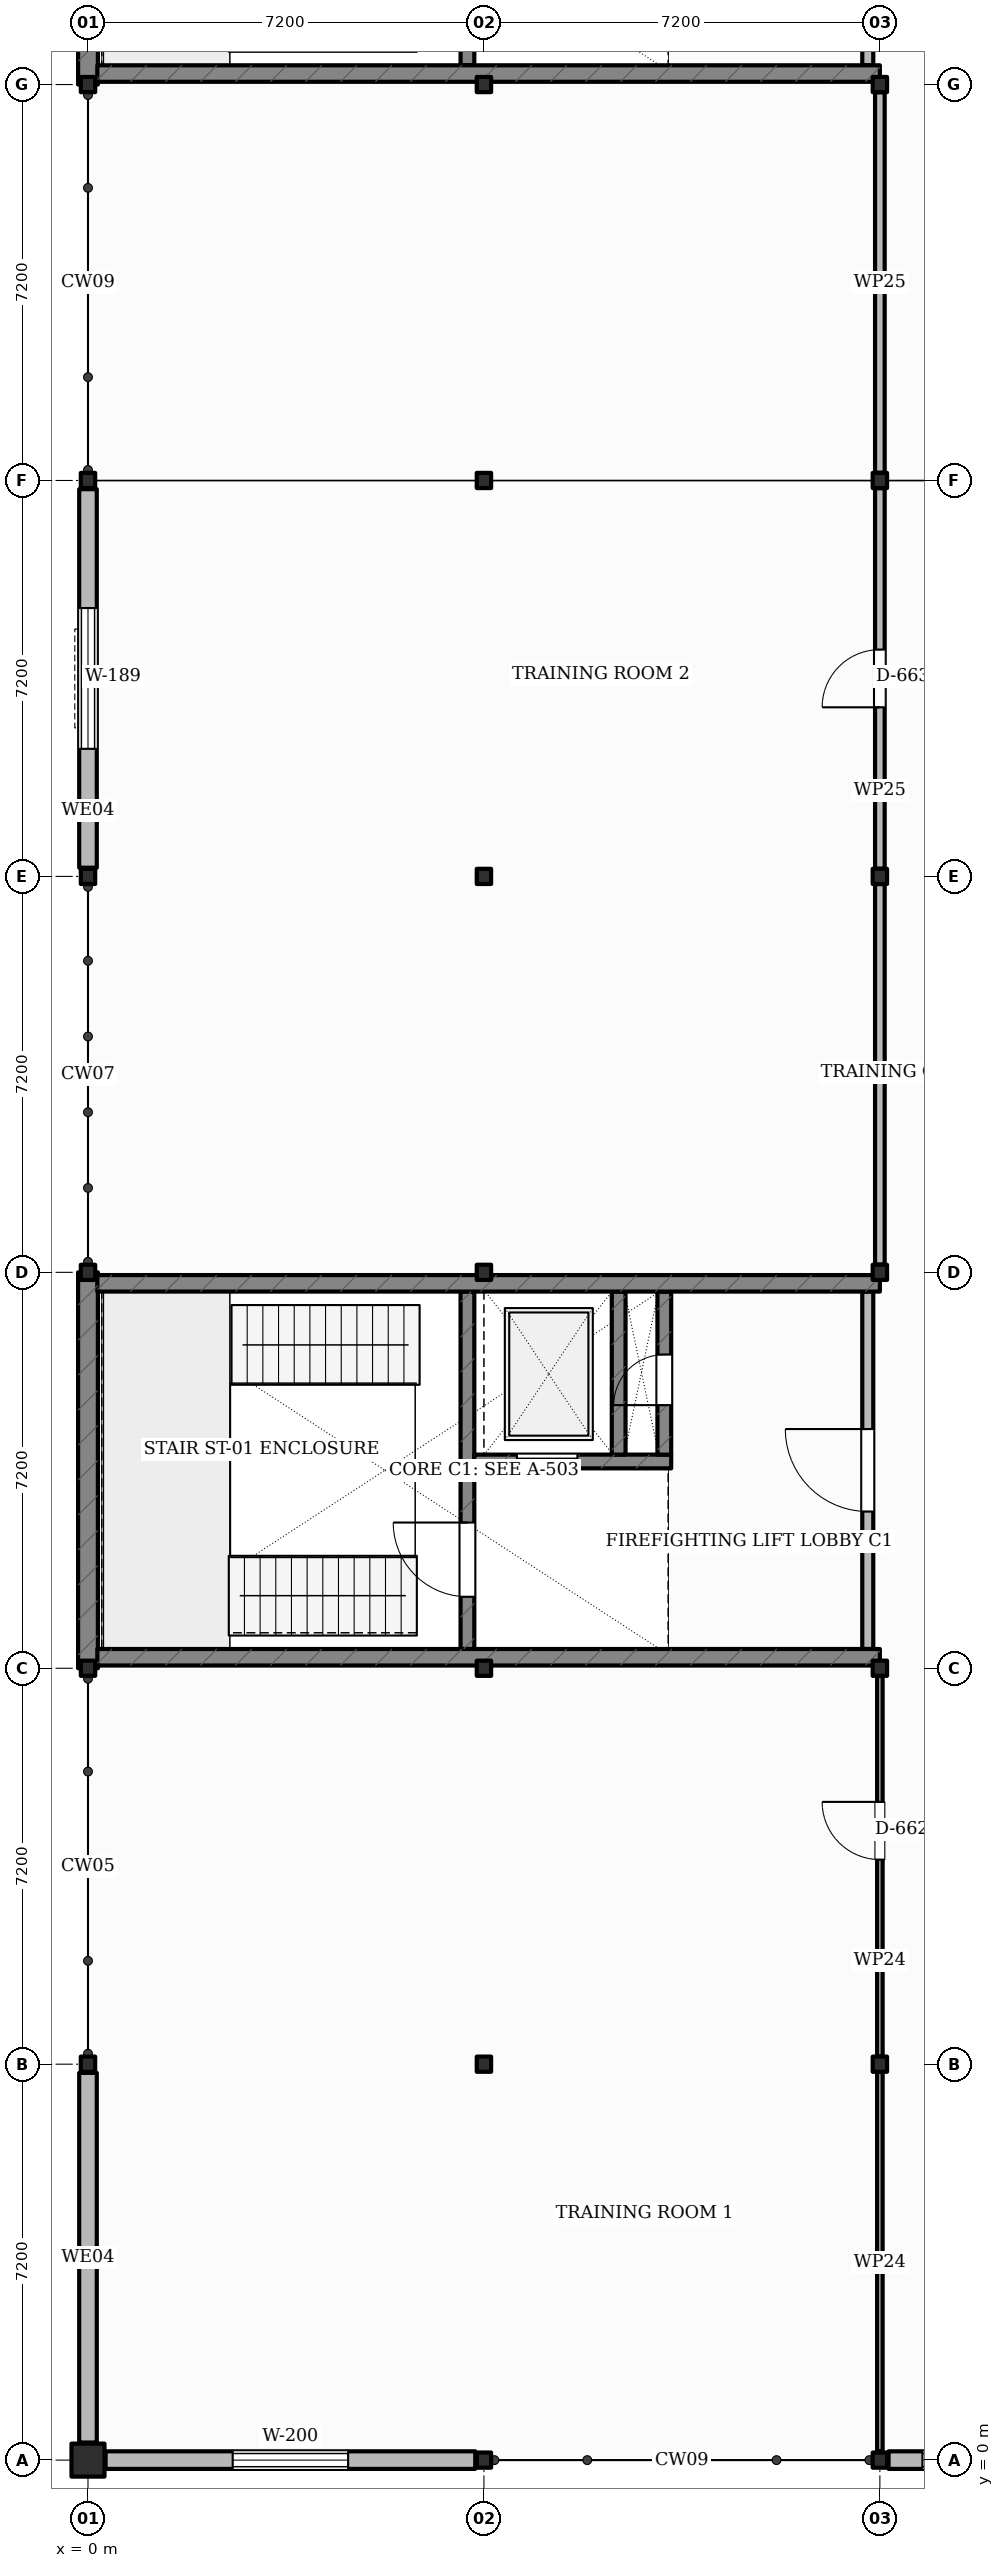
"""IFC4 building model, lengths in metres.
Left out: names, types, materials, properties, quantities, classifications, styles, units other than length and angle.
Written with IfcOpenShell. Run it as: python <this file> out.ifc"""

import sys

from ifc_helpers import new_model, si_unit, direction, frame, frame_2d, origin, origin_with_axes, origin_2d, place, context, subcontext, project, spatial, rectangle, i_section, extrude, element, fill, save


model = new_model("IFC4")
c1 = context("Model", 3, precision=1e-05, world=origin(), true_north=direction((0.0, 1.0)))
c2 = subcontext(c1, "Body", "Model", "MODEL_VIEW")
j1 = project(units=[si_unit("LENGTHUNIT", "METRE"), si_unit("PLANEANGLEUNIT", "RADIAN")], contexts=[c1])
p1 = place(None, origin())
s1 = spatial("IfcSite", under=j1, at=p1, CompositionType="ELEMENT")
p2 = place(p1, origin())
s2 = spatial("IfcBuilding", under=s1, at=p2, CompositionType="ELEMENT")
p3 = place(p2, frame((0.0, 0.0, 9.9)))
s3 = spatial("IfcBuildingStorey", under=s2, at=p3, CompositionType="ELEMENT", Elevation=9.9)
p4 = place(p3, origin_with_axes())
e1 = element("IfcColumn", 1, at=p4, inside=s3, PredefinedType="COLUMN", context=c2, shape_type="SweptSolid", body=[
    extrude(rectangle(XDim=0.6, YDim=0.6, at=origin_2d()), origin(), (0.0, 0.0, 1.0), 4.5),
])
for number, where, z_axis, x_axis in (
    (2, (0.0, 7.2, 0.0), (0.0, 0.0, 1.0), (1.0, 0.0, 0.0)),
    (3, (0.0, 14.4, 0.0), (0.0, 0.0, 1.0), (1.0, 0.0, 0.0)),
    (4, (0.0, 21.6, 0.0), (0.0, 0.0, 1.0), (1.0, 0.0, 0.0)),
    (5, (0.0, 28.8, 0.0), (0.0, 0.0, 1.0), (1.0, 0.0, 0.0)),
    (6, (0.0, 36.0, 0.0), (0.0, 0.0, 1.0), (1.0, 0.0, 0.0)),
    (7, (0.0, 43.2, 0.0), (0.0, 0.0, 1.0), (1.0, 0.0, 0.0)),
    (8, (7.2, 0.0, 0.0), (0.0, 0.0, 1.0), (1.0, 0.0, 0.0)),
    (9, (7.2, 7.2, 0.0), (0.0, 0.0, 1.0), (1.0, 0.0, 0.0)),
    (10, (7.2, 14.4, 0.0), (0.0, 0.0, 1.0), (1.0, 0.0, 0.0)),
    (11, (7.2, 21.6, 0.0), (0.0, 0.0, 1.0), (1.0, 0.0, 0.0)),
    (12, (7.2, 28.8, 0.0), (0.0, 0.0, 1.0), (1.0, 0.0, 0.0)),
    (13, (7.2, 36.0, 0.0), (0.0, 0.0, 1.0), (1.0, 0.0, 0.0)),
    (14, (7.2, 43.2, 0.0), (0.0, 0.0, 1.0), (1.0, 0.0, 0.0)),
    (15, (14.4, 0.0, 0.0), (0.0, 0.0, 1.0), (1.0, 0.0, 0.0)),
    (16, (14.4, 7.2, 0.0), (0.0, 0.0, 1.0), (1.0, 0.0, 0.0)),
    (17, (14.4, 14.4, 0.0), (0.0, 0.0, 1.0), (1.0, 0.0, 0.0)),
    (18, (14.4, 21.6, 0.0), (0.0, 0.0, 1.0), (1.0, 0.0, 0.0)),
    (19, (14.4, 28.8, 0.0), (0.0, 0.0, 1.0), (1.0, 0.0, 0.0)),
    (20, (14.4, 36.0, 0.0), (0.0, 0.0, 1.0), (1.0, 0.0, 0.0)),
    (21, (14.4, 43.2, 0.0), (0.0, 0.0, 1.0), (1.0, 0.0, 0.0)),
):
    element("IfcColumn", number, at=place(p3, frame(where, z_axis=z_axis, x_axis=x_axis)), inside=s3, PredefinedType="COLUMN", context=c2, shape_type="SweptSolid", body=[
        extrude(i_section(OverallWidth=0.261, OverallDepth=0.276, WebThickness=0.015, FlangeThickness=0.025, FilletRadius=0.013, at=origin_2d()), origin(), (0.0, 0.0, 1.0), 4.5),
    ])
p5 = place(p3, frame((0.0, 0.32, 0.0), z_axis=(0.0, 0.0, 1.0), x_axis=(0.0, 1.0, 0.0)))
e22 = element("IfcWall", 22, at=p5, inside=s3, PredefinedType="SOLIDWALL", context=c2, shape_type="SweptSolid", body=[
    extrude(rectangle(XDim=6.722, YDim=0.32, at=frame_2d((3.361, 0.0))), origin(), (0.0, 0.0, 1.0), 3.415),
])
p6 = place(p3, frame((0.0, 14.4, 0.0), z_axis=(0.0, 0.0, 1.0), x_axis=(0.0, 1.0, 0.0)))
e23 = element("IfcWall", 23, at=p6, inside=s3, PredefinedType="SHEAR", context=c2, shape_type="SweptSolid", body=[
    extrude(rectangle(XDim=7.2, YDim=0.36, at=frame_2d((3.6, 0.0))), origin(), (0.0, 0.0, 1.0), 3.8),
])
p7 = place(p3, frame((0.0, 28.958, 0.0), z_axis=(0.0, 0.0, 1.0), x_axis=(0.0, 1.0, 0.0)))
e24 = element("IfcWall", 24, at=p7, inside=s3, PredefinedType="SOLIDWALL", context=c2, shape_type="SweptSolid", body=[
    extrude(rectangle(XDim=6.884, YDim=0.32, at=frame_2d((3.442, 0.0))), origin(), (0.0, 0.0, 1.0), 3.8),
])
p8 = place(p7, frame((2.162, 0.0, 1.05)))
e25 = element("IfcOpeningElement", 25, at=p8, cuts=e24, PredefinedType="OPENING", context=c2, shape_type="SweptSolid", body=[
    extrude(rectangle(XDim=2.56, YDim=1.55, at=frame_2d((1.28, 0.775))), frame((0.0, 0.17, 0.0), z_axis=(0.0, -1.0, 0.0), x_axis=(1.0, 0.0, 0.0)), (0.0, 0.0, 1.0), 0.34),
])
p9 = place(p3, frame((0.0, 43.2, 0.0), z_axis=(0.0, 0.0, 1.0), x_axis=(0.0, 1.0, 0.0)))
e26 = element("IfcWall", 26, at=p9, inside=s3, PredefinedType="SHEAR", context=c2, shape_type="SweptSolid", body=[
    extrude(rectangle(XDim=7.2, YDim=0.36, at=frame_2d((3.6, 0.0))), origin(), (0.0, 0.0, 1.0), 3.8),
])
p10 = place(p3, frame((21.442, 0.0, 0.0), z_axis=(0.0, 0.0, 1.0), x_axis=(-1.0, 0.0, 0.0)))
e27 = element("IfcWall", 27, at=p10, inside=s3, PredefinedType="SOLIDWALL", context=c2, shape_type="SweptSolid", body=[
    extrude(rectangle(XDim=6.884, YDim=0.32, at=frame_2d((3.442, 0.0))), origin(), (0.0, 0.0, 1.0), 3.8),
])
p11 = place(p10, frame((3.708, 0.0, 1.05)))
e28 = element("IfcOpeningElement", 28, at=p11, cuts=e27, PredefinedType="OPENING", context=c2, shape_type="SweptSolid", body=[
    extrude(rectangle(XDim=2.56, YDim=1.55, at=frame_2d((1.28, 0.775))), frame((0.0, 0.17, 0.0), z_axis=(0.0, -1.0, 0.0), x_axis=(1.0, 0.0, 0.0)), (0.0, 0.0, 1.0), 0.34),
])
p12 = place(p3, frame((7.042, 0.0, 0.0), z_axis=(0.0, 0.0, 1.0), x_axis=(-1.0, 0.0, 0.0)))
e29 = element("IfcWall", 29, at=p12, inside=s3, PredefinedType="SOLIDWALL", context=c2, shape_type="SweptSolid", body=[
    extrude(rectangle(XDim=6.722, YDim=0.32, at=frame_2d((3.361, 0.0))), origin(), (0.0, 0.0, 1.0), 3.415),
])
p13 = place(p12, frame((2.311, 0.0, 1.05)))
e30 = element("IfcOpeningElement", 30, at=p13, cuts=e29, PredefinedType="OPENING", context=c2, shape_type="SweptSolid", body=[
    extrude(rectangle(XDim=2.1, YDim=1.8, at=frame_2d((1.05, 0.9))), frame((0.0, 0.17, 0.0), z_axis=(0.0, -1.0, 0.0), x_axis=(1.0, 0.0, 0.0)), (0.0, 0.0, 1.0), 0.34),
])
p14 = place(p3, frame((6.9, 14.75, 0.0), z_axis=(0.0, 0.0, 1.0), x_axis=(0.0, 1.0, 0.0)))
e31 = element("IfcWall", 31, at=p14, inside=s3, PredefinedType="SHEAR", context=c2, shape_type="SweptSolid", body=[
    extrude(rectangle(XDim=6.5, YDim=0.25, at=frame_2d((3.25, 0.0))), origin(), (0.0, 0.0, 1.0), 3.6),
])
p15 = place(p14, frame((0.95, 0.0, 0.0)))
e32 = element("IfcOpeningElement", 32, at=p15, cuts=e31, PredefinedType="OPENING", context=c2, shape_type="SweptSolid", body=[
    extrude(rectangle(XDim=1.35, YDim=2.15, at=frame_2d((0.675, 1.075))), frame((0.0, 0.135, 0.0), z_axis=(0.0, -1.0, 0.0), x_axis=(1.0, 0.0, 0.0)), (0.0, 0.0, 1.0), 0.27),
])
p16 = place(p3, frame((7.025, 18.16, 0.0), z_axis=(0.0, 0.0, 1.0), x_axis=(1.0, 0.0, 0.0)))
e33 = element("IfcWall", 33, at=p16, inside=s3, PredefinedType="SHEAR", context=c2, shape_type="SweptSolid", body=[
    extrude(rectangle(XDim=3.58, YDim=0.25, at=frame_2d((1.79, 0.0))), origin(), (0.0, 0.0, 1.0), 3.6),
])
p17 = place(p16, frame((0.775, 0.0, 0.0)))
e34 = element("IfcOpeningElement", 34, at=p17, cuts=e33, PredefinedType="OPENING", context=c2, shape_type="SweptSolid", body=[
    extrude(rectangle(XDim=1.1, YDim=2.15, at=frame_2d((0.55, 1.075))), frame((0.0, 0.135, 0.0), z_axis=(0.0, -1.0, 0.0), x_axis=(1.0, 0.0, 0.0)), (0.0, 0.0, 1.0), 0.27),
])
p18 = place(p3, frame((9.65, 18.285, 0.0), z_axis=(0.0, 0.0, 1.0), x_axis=(0.0, 1.0, 0.0)))
e35 = element("IfcWall", 35, at=p18, inside=s3, PredefinedType="SHEAR", context=c2, shape_type="SweptSolid", body=[
    extrude(rectangle(XDim=2.965, YDim=0.25, at=frame_2d((1.482, 0.0))), origin(), (0.0, 0.0, 1.0), 3.6),
])
p19 = place(p3, frame((10.48, 18.285, 0.0), z_axis=(0.0, 0.0, 1.0), x_axis=(0.0, 1.0, 0.0)))
e36 = element("IfcWall", 36, at=p19, inside=s3, PredefinedType="SHEAR", context=c2, shape_type="SweptSolid", body=[
    extrude(rectangle(XDim=2.965, YDim=0.25, at=frame_2d((1.482, 0.0))), origin(), (0.0, 0.0, 1.0), 3.6),
])
p20 = place(p19, frame((0.9, 0.0, 0.0)))
e37 = element("IfcOpeningElement", 37, at=p20, cuts=e36, PredefinedType="OPENING", context=c2, shape_type="SweptSolid", body=[
    extrude(rectangle(XDim=0.92, YDim=2.05, at=frame_2d((0.46, 1.025))), frame((0.0, 0.135, 0.0), z_axis=(0.0, -1.0, 0.0), x_axis=(1.0, 0.0, 0.0)), (0.0, 0.0, 1.0), 0.27),
])
p21 = place(p3, frame((14.18, 14.75, 0.0), z_axis=(0.0, 0.0, 1.0), x_axis=(0.0, 1.0, 0.0)))
e38 = element("IfcWall", 38, at=p21, inside=s3, PredefinedType="SOLIDWALL", context=c2, shape_type="SweptSolid", body=[
    extrude(rectangle(XDim=6.5, YDim=0.2, at=frame_2d((3.25, 0.0))), origin(), (0.0, 0.0, 1.0), 3.6),
])
p22 = place(p21, frame((2.5, 0.0, 0.0)))
e39 = element("IfcOpeningElement", 39, at=p22, cuts=e38, PredefinedType="OPENING", context=c2, shape_type="SweptSolid", body=[
    extrude(rectangle(XDim=1.5, YDim=2.15, at=frame_2d((0.75, 1.075))), frame((0.0, 0.11, 0.0), z_axis=(0.0, -1.0, 0.0), x_axis=(1.0, 0.0, 0.0)), (0.0, 0.0, 1.0), 0.22),
])
for number, where, z_axis, x_axis in (
    (40, (0.17, 14.6, 0.0), (0.0, 0.0, 1.0), (1.0, 0.0, 0.0)),
    (41, (0.17, 21.4, 0.0), (0.0, 0.0, 1.0), (1.0, 0.0, 0.0)),
):
    element("IfcWall", number, at=place(p3, frame(where, z_axis=z_axis, x_axis=x_axis)), inside=s3, PredefinedType="SHEAR", context=c2, shape_type="SweptSolid", body=[
        extrude(rectangle(XDim=14.23, YDim=0.3, at=frame_2d((7.115, 0.0))), origin(), (0.0, 0.0, 1.0), 3.6),
    ])
p23 = place(p3, frame((6.9, 43.55, 0.0), z_axis=(0.0, 0.0, 1.0), x_axis=(0.0, 1.0, 0.0)))
e42 = element("IfcWall", 42, at=p23, inside=s3, PredefinedType="SHEAR", context=c2, shape_type="SweptSolid", body=[
    extrude(rectangle(XDim=6.5, YDim=0.25, at=frame_2d((3.25, 0.0))), origin(), (0.0, 0.0, 1.0), 3.6),
])
p24 = place(p23, frame((0.95, 0.0, 0.0)))
e43 = element("IfcOpeningElement", 43, at=p24, cuts=e42, PredefinedType="OPENING", context=c2, shape_type="SweptSolid", body=[
    extrude(rectangle(XDim=1.35, YDim=2.15, at=frame_2d((0.675, 1.075))), frame((0.0, 0.135, 0.0), z_axis=(0.0, -1.0, 0.0), x_axis=(1.0, 0.0, 0.0)), (0.0, 0.0, 1.0), 0.27),
])
p25 = place(p3, frame((14.18, 43.55, 0.0), z_axis=(0.0, 0.0, 1.0), x_axis=(0.0, 1.0, 0.0)))
e44 = element("IfcWall", 44, at=p25, inside=s3, PredefinedType="SOLIDWALL", context=c2, shape_type="SweptSolid", body=[
    extrude(rectangle(XDim=6.5, YDim=0.2, at=frame_2d((3.25, 0.0))), origin(), (0.0, 0.0, 1.0), 3.6),
])
p26 = place(p25, frame((2.5, 0.0, 0.0)))
e45 = element("IfcOpeningElement", 45, at=p26, cuts=e44, PredefinedType="OPENING", context=c2, shape_type="SweptSolid", body=[
    extrude(rectangle(XDim=1.5, YDim=2.15, at=frame_2d((0.75, 1.075))), frame((0.0, 0.11, 0.0), z_axis=(0.0, -1.0, 0.0), x_axis=(1.0, 0.0, 0.0)), (0.0, 0.0, 1.0), 0.22),
])
p27 = place(p3, frame((0.17, 43.4, 0.0), z_axis=(0.0, 0.0, 1.0), x_axis=(1.0, 0.0, 0.0)))
e46 = element("IfcWall", 46, at=p27, inside=s3, PredefinedType="SHEAR", context=c2, shape_type="SweptSolid", body=[
    extrude(rectangle(XDim=14.23, YDim=0.3, at=frame_2d((7.115, 0.0))), origin(), (0.0, 0.0, 1.0), 3.6),
])
p28 = place(p3, frame((14.4, 0.16, 0.0), z_axis=(0.0, 0.0, 1.0), x_axis=(0.0, 1.0, 0.0)))
e47 = element("IfcWall", 47, at=p28, inside=s3, PredefinedType="PARTITIONING", context=c2, shape_type="SweptSolid", body=[
    extrude(rectangle(XDim=6.9, YDim=0.1, at=frame_2d((3.45, 0.0))), origin(), (0.0, 0.0, 1.0), 3.55),
])
p29 = place(p3, frame((14.4, 7.34, 0.0), z_axis=(0.0, 0.0, 1.0), x_axis=(0.0, 1.0, 0.0)))
e48 = element("IfcWall", 48, at=p29, inside=s3, PredefinedType="PARTITIONING", context=c2, shape_type="SweptSolid", body=[
    extrude(rectangle(XDim=6.92, YDim=0.1, at=frame_2d((3.46, 0.0))), origin(), (0.0, 0.0, 1.0), 3.55),
])
p30 = place(p29, frame((3.58, 0.0, 0.0)))
e49 = element("IfcOpeningElement", 49, at=p30, cuts=e48, PredefinedType="OPENING", context=c2, shape_type="SweptSolid", body=[
    extrude(rectangle(XDim=1.05, YDim=2.15, at=frame_2d((0.525, 1.075))), frame((0.0, 0.06, 0.0), z_axis=(0.0, -1.0, 0.0), x_axis=(1.0, 0.0, 0.0)), (0.0, 0.0, 1.0), 0.12),
])
p31 = place(p3, frame((14.4, 21.74, 0.0), z_axis=(0.0, 0.0, 1.0), x_axis=(0.0, 1.0, 0.0)))
e50 = element("IfcWall", 50, at=p31, inside=s3, PredefinedType="PARTITIONING", context=c2, shape_type="SweptSolid", body=[
    extrude(rectangle(XDim=6.92, YDim=0.175, at=frame_2d((3.46, 0.0))), origin(), (0.0, 0.0, 1.0), 3.55),
])
p32 = place(p3, frame((14.4, 28.94, 0.0), z_axis=(0.0, 0.0, 1.0), x_axis=(0.0, 1.0, 0.0)))
e51 = element("IfcWall", 51, at=p32, inside=s3, PredefinedType="PARTITIONING", context=c2, shape_type="SweptSolid", body=[
    extrude(rectangle(XDim=6.92, YDim=0.175, at=frame_2d((3.46, 0.0))), origin(), (0.0, 0.0, 1.0), 3.55),
])
p33 = place(p32, frame((2.935, 0.0, 0.0)))
e52 = element("IfcOpeningElement", 52, at=p33, cuts=e51, PredefinedType="OPENING", context=c2, shape_type="SweptSolid", body=[
    extrude(rectangle(XDim=1.05, YDim=2.15, at=frame_2d((0.525, 1.075))), frame((0.0, 0.097, 0.0), z_axis=(0.0, -1.0, 0.0), x_axis=(1.0, 0.0, 0.0)), (0.0, 0.0, 1.0), 0.195),
])
p34 = place(p3, frame((14.4, 36.14, 0.0), z_axis=(0.0, 0.0, 1.0), x_axis=(0.0, 1.0, 0.0)))
e53 = element("IfcWall", 53, at=p34, inside=s3, PredefinedType="PARTITIONING", context=c2, shape_type="SweptSolid", body=[
    extrude(rectangle(XDim=6.92, YDim=0.175, at=frame_2d((3.46, 0.0))), origin(), (0.0, 0.0, 1.0), 3.55),
])
p35 = place(p8, origin())
e54 = element("IfcWindow", 54, at=p35, inside=s3, PartitioningType="SINGLE_PANEL", PredefinedType="WINDOW", context=c2, shape_type="SweptSolid", body=[
    extrude(rectangle(XDim=2.56, YDim=1.55, at=frame_2d((1.28, 0.775))), frame((0.0, 0.03, 0.0), z_axis=(0.0, -1.0, 0.0), x_axis=(1.0, 0.0, 0.0)), (0.0, 0.0, 1.0), 0.06),
])
fill(e25, e54)
p36 = place(p11, origin())
e55 = element("IfcWindow", 55, at=p36, inside=s3, PartitioningType="SINGLE_PANEL", PredefinedType="WINDOW", context=c2, shape_type="SweptSolid", body=[
    extrude(rectangle(XDim=2.56, YDim=1.55, at=frame_2d((1.28, 0.775))), frame((0.0, 0.03, 0.0), z_axis=(0.0, -1.0, 0.0), x_axis=(1.0, 0.0, 0.0)), (0.0, 0.0, 1.0), 0.06),
])
fill(e28, e55)
p37 = place(p13, origin())
e56 = element("IfcWindow", 56, at=p37, inside=s3, PartitioningType="SINGLE_PANEL", PredefinedType="WINDOW", context=c2, shape_type="SweptSolid", body=[
    extrude(rectangle(XDim=2.1, YDim=1.8, at=frame_2d((1.05, 0.9))), frame((0.0, 0.03, 0.0), z_axis=(0.0, -1.0, 0.0), x_axis=(1.0, 0.0, 0.0)), (0.0, 0.0, 1.0), 0.06),
])
fill(e30, e56)
p38 = place(p15, origin())
e57 = element("IfcDoor", 57, at=p38, inside=s3, OperationType="SINGLE_SWING_RIGHT", PredefinedType="DOOR", context=c2, shape_type="SweptSolid", body=[
    extrude(rectangle(XDim=1.35, YDim=2.15, at=frame_2d((0.675, 1.075))), frame((0.0, 0.025, 0.0), z_axis=(0.0, -1.0, 0.0), x_axis=(1.0, 0.0, 0.0)), (0.0, 0.0, 1.0), 0.05),
])
fill(e32, e57)
p39 = place(p17, origin())
e58 = element("IfcDoor", 58, at=p39, inside=s3, OperationType="SLIDING_TO_LEFT", PredefinedType="DOOR", context=c2, shape_type="SweptSolid", body=[
    extrude(rectangle(XDim=1.1, YDim=2.15, at=frame_2d((0.55, 1.075))), frame((0.0, 0.025, 0.0), z_axis=(0.0, -1.0, 0.0), x_axis=(1.0, 0.0, 0.0)), (0.0, 0.0, 1.0), 0.05),
])
fill(e34, e58)
p40 = place(p20, origin())
e59 = element("IfcDoor", 59, at=p40, inside=s3, OperationType="SINGLE_SWING_LEFT", PredefinedType="DOOR", context=c2, shape_type="SweptSolid", body=[
    extrude(rectangle(XDim=0.92, YDim=2.05, at=frame_2d((0.46, 1.025))), frame((0.0, 0.025, 0.0), z_axis=(0.0, -1.0, 0.0), x_axis=(1.0, 0.0, 0.0)), (0.0, 0.0, 1.0), 0.05),
])
fill(e37, e59)
p41 = place(p22, origin())
e60 = element("IfcDoor", 60, at=p41, inside=s3, OperationType="SINGLE_SWING_RIGHT", PredefinedType="DOOR", context=c2, shape_type="SweptSolid", body=[
    extrude(rectangle(XDim=1.5, YDim=2.15, at=frame_2d((0.75, 1.075))), frame((0.0, 0.025, 0.0), z_axis=(0.0, -1.0, 0.0), x_axis=(1.0, 0.0, 0.0)), (0.0, 0.0, 1.0), 0.05),
])
fill(e39, e60)
p42 = place(p30, origin())
e61 = element("IfcDoor", 61, at=p42, inside=s3, OperationType="SINGLE_SWING_RIGHT", PredefinedType="DOOR", context=c2, shape_type="SweptSolid", body=[
    extrude(rectangle(XDim=1.05, YDim=2.15, at=frame_2d((0.525, 1.075))), frame((0.0, 0.025, 0.0), z_axis=(0.0, -1.0, 0.0), x_axis=(1.0, 0.0, 0.0)), (0.0, 0.0, 1.0), 0.05),
])
fill(e49, e61)
p43 = place(p33, origin())
e62 = element("IfcDoor", 62, at=p43, inside=s3, OperationType="SINGLE_SWING_LEFT", PredefinedType="DOOR", context=c2, shape_type="SweptSolid", body=[
    extrude(rectangle(XDim=1.05, YDim=2.15, at=frame_2d((0.525, 1.075))), frame((0.0, 0.025, 0.0), z_axis=(0.0, -1.0, 0.0), x_axis=(1.0, 0.0, 0.0)), (0.0, 0.0, 1.0), 0.05),
])
fill(e52, e62)
save(model, sys.argv[1])
